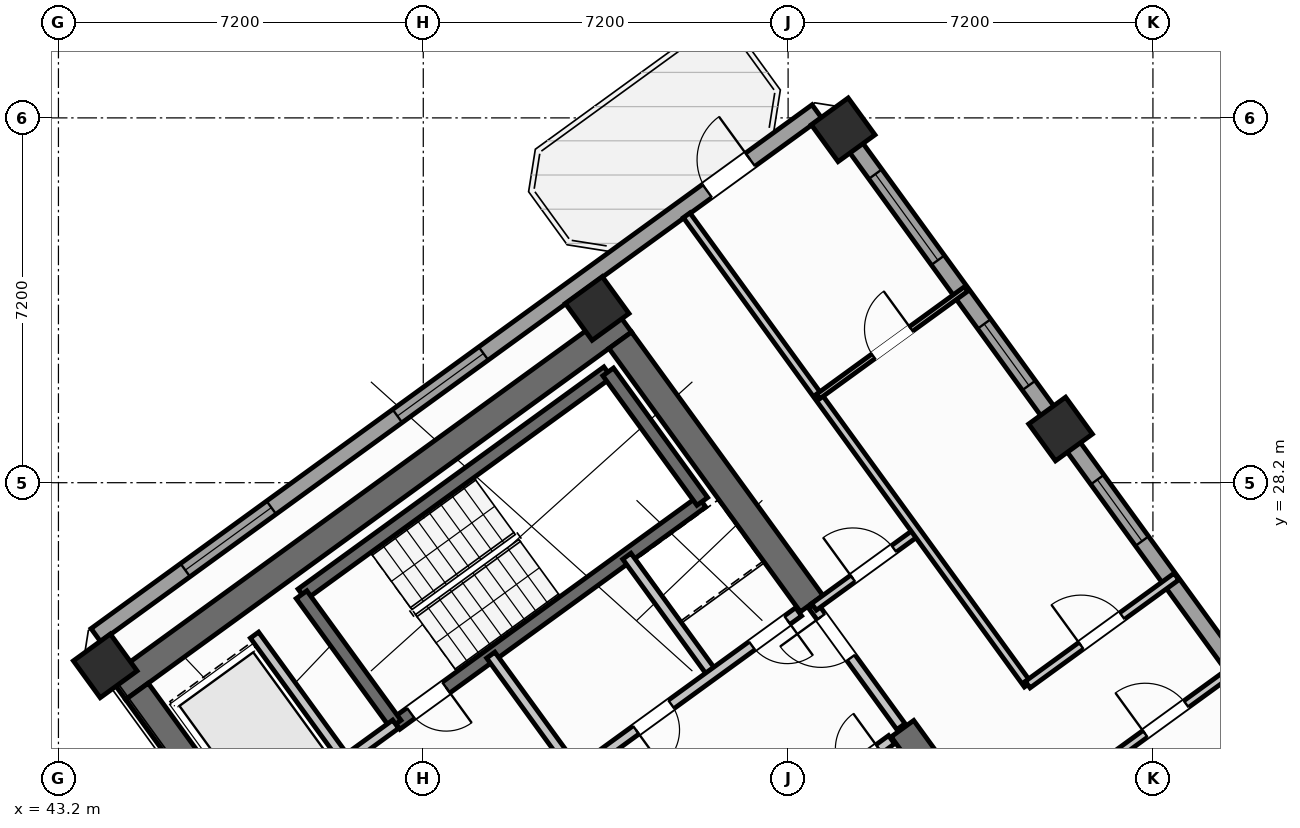
"""IFC4 building model, lengths in metres.
Left out: names, types, materials, properties, quantities, classifications, styles, units other than length and angle.
Written with IfcOpenShell. Run it as: python <this file> out.ifc"""

import sys

from ifc_helpers import new_model, si_unit, direction, frame, frame_2d, origin, origin_2d, place, context, subcontext, project, spatial, rectangle, hollow_rectangle, extrude, source, transform, mapped, element, fill, save


model = new_model("IFC4")
c1 = context("Model", 3, precision=1e-05, world=origin(), true_north=direction((0.0, 1.0)))
c2 = subcontext(c1, "Body", "Model", "MODEL_VIEW")
j1 = project(units=[si_unit("LENGTHUNIT", "METRE"), si_unit("PLANEANGLEUNIT", "RADIAN")], contexts=[c1])
p1 = place(None, origin())
s1 = spatial("IfcSite", under=j1, at=p1, CompositionType="ELEMENT")
p2 = place(p1, origin())
s2 = spatial("IfcBuilding", under=s1, at=p2, CompositionType="ELEMENT")
p3 = place(p2, frame((0.0, 0.0, 132.6)))
s3 = spatial("IfcBuildingStorey", under=s2, at=p3, CompositionType="ELEMENT", Elevation=132.6)
p4 = place(p3, frame((44.365, 24.142, 0.0), z_axis=(0.0, 0.0, 1.0), x_axis=(0.809024304885, 0.587775190107, 0.0)))
e1 = element("IfcWall", 1, at=p4, inside=s3, PredefinedType="SHEAR", context=c2, shape_type="SweptSolid", body=[
    extrude(rectangle(XDim=12.34, YDim=0.55, at=frame_2d((6.17, 0.0))), origin(), (0.0, 0.0, 1.0), 3.32),
])
p5 = place(p3, frame((48.526, 18.884, 0.0), z_axis=(0.0, 0.0, 1.0), x_axis=(-0.587764933797, 0.809031756236, 0.0)))
e2 = element("IfcWall", 2, at=p5, inside=s3, PredefinedType="SHEAR", context=c2, shape_type="SweptSolid", body=[
    extrude(rectangle(XDim=6.425, YDim=0.55, at=frame_2d((3.212, 0.0))), origin(), (0.0, 0.0, 1.0), 3.32),
])
p6 = place(p3, frame((61.958, 20.454, 0.0), z_axis=(0.0, 0.0, 1.0), x_axis=(-0.587802113096, 0.809004744015, 0.0)))
e3 = element("IfcWall", 3, at=p6, inside=s3, PredefinedType="SHEAR", context=c2, shape_type="SweptSolid", body=[
    extrude(rectangle(XDim=3.575, YDim=0.55, at=frame_2d((1.788, 0.0))), origin(), (0.0, 0.0, 1.0), 3.32),
])
p7 = place(p3, frame((58.064, 25.813, 0.0), z_axis=(0.0, 0.0, 1.0), x_axis=(-0.587764933797, 0.809031756236, 0.0)))
e4 = element("IfcWall", 4, at=p7, inside=s3, PredefinedType="SHEAR", context=c2, shape_type="SweptSolid", body=[
    extrude(rectangle(XDim=6.425, YDim=0.55, at=frame_2d((3.212, 0.0))), origin(), (0.0, 0.0, 1.0), 3.32),
])
m1 = source(origin(), c2, "Body", "SweptSolid", [
    extrude(hollow_rectangle(XDim=0.9, YDim=0.9, WallThickness=0.036, at=origin_2d()), origin(), (0.0, 0.0, 1.0), 3.6),
])
for number, where, z_axis, x_axis in (
    (5, (44.124, 24.585, 0.0), (0.0, 0.0, 1.0), (0.809, 0.588, 0.0)),
    (6, (53.832, 31.638, 0.0), (0.0, 0.0, 1.0), (0.809, 0.588, 0.0)),
    (7, (62.977, 29.259, 0.0), (0.0, 0.0, 1.0), (0.809, 0.588, 0.0)),
    (8, (58.686, 35.165, 0.0), (0.0, 0.0, 1.0), (0.809, 0.588, 0.0)),
):
    element("IfcColumn", number, at=place(p3, frame(where, z_axis=z_axis, x_axis=x_axis)), inside=s3, PredefinedType="COLUMN", context=c2, shape_type="MappedRepresentation", body=[
        mapped(m1, transform((0.0, 0.0, 0.0), scale=1.0)),
    ])
p8 = place(p3, frame((43.938, 25.192, 0.0), z_axis=(0.0, 0.0, 1.0), x_axis=(0.809016324578, 0.587786174187, 0.0)))
e9 = element("IfcWall", 9, at=p8, inside=s3, PredefinedType="STANDARD", context=c2, shape_type="SweptSolid", body=[
    extrude(rectangle(XDim=17.587, YDim=0.32, at=frame_2d((8.794, 0.0))), origin(), (0.0, 0.0, 1.0), 3.32),
])
p9 = place(p8, frame((14.914, 0.0, 0.0)))
e10 = element("IfcOpeningElement", 10, at=p9, cuts=e9, PredefinedType="OPENING", context=c2, shape_type="SweptSolid", body=[
    extrude(rectangle(XDim=1.05, YDim=2.15, at=frame_2d((0.525, 1.075))), frame((0.0, 0.17, 0.0), z_axis=(0.0, -1.0, 0.0), x_axis=(1.0, 0.0, 0.0)), (0.0, 0.0, 1.0), 0.34),
])
p10 = place(p8, frame((2.182, 0.0, 0.8)))
e11 = element("IfcOpeningElement", 11, at=p10, cuts=e9, PredefinedType="OPENING", context=c2, shape_type="SweptSolid", body=[
    extrude(rectangle(XDim=2.1, YDim=1.55, at=frame_2d((1.05, 0.775))), frame((0.0, 0.17, 0.0), z_axis=(0.0, -1.0, 0.0), x_axis=(1.0, 0.0, 0.0)), (0.0, 0.0, 1.0), 0.34),
])
p11 = place(p8, frame((7.356, 0.0, 0.8)))
e12 = element("IfcOpeningElement", 12, at=p11, cuts=e9, PredefinedType="OPENING", context=c2, shape_type="SweptSolid", body=[
    extrude(rectangle(XDim=2.1, YDim=1.55, at=frame_2d((1.05, 0.775))), frame((0.0, 0.17, 0.0), z_axis=(0.0, -1.0, 0.0), x_axis=(1.0, 0.0, 0.0)), (0.0, 0.0, 1.0), 0.34),
])
p12 = place(p3, frame((58.455, 35.484, 0.0), z_axis=(0.0, 0.0, 1.0), x_axis=(0.587783625747, -0.809018176127, 0.0)))
e13 = element("IfcWall", 13, at=p12, inside=s3, PredefinedType="STANDARD", context=c2, shape_type="SweptSolid", body=[
    extrude(rectangle(XDim=21.587, YDim=0.32, at=frame_2d((10.794, 0.0))), origin(), (0.0, 0.0, 1.0), 2.745),
])
p13 = place(p12, frame((1.475, 0.0, 0.8)))
e14 = element("IfcOpeningElement", 14, at=p13, cuts=e13, PredefinedType="OPENING", context=c2, shape_type="SweptSolid", body=[
    extrude(rectangle(XDim=2.1, YDim=1.55, at=frame_2d((1.05, 0.775))), frame((0.0, 0.17, 0.0), z_axis=(0.0, -1.0, 0.0), x_axis=(1.0, 0.0, 0.0)), (0.0, 0.0, 1.0), 0.34),
])
p14 = place(p12, frame((5.13, 0.0, 0.85)))
e15 = element("IfcOpeningElement", 15, at=p14, cuts=e13, PredefinedType="OPENING", context=c2, shape_type="SweptSolid", body=[
    extrude(rectangle(XDim=1.5, YDim=1.5, at=frame_2d((0.75, 0.75))), frame((0.0, 0.17, 0.0), z_axis=(0.0, -1.0, 0.0), x_axis=(1.0, 0.0, 0.0)), (0.0, 0.0, 1.0), 0.34),
])
p15 = place(p12, frame((8.929, 0.0, 0.85)))
e16 = element("IfcOpeningElement", 16, at=p15, cuts=e13, PredefinedType="OPENING", context=c2, shape_type="SweptSolid", body=[
    extrude(rectangle(XDim=1.5, YDim=1.5, at=frame_2d((0.75, 0.75))), frame((0.0, 0.17, 0.0), z_axis=(0.0, -1.0, 0.0), x_axis=(1.0, 0.0, 0.0)), (0.0, 0.0, 1.0), 0.34),
])
p16 = place(p12, frame((17.581, 0.0, 0.95)))
e17 = element("IfcOpeningElement", 17, at=p16, cuts=e13, PredefinedType="OPENING", context=c2, shape_type="SweptSolid", body=[
    extrude(rectangle(XDim=1.2, YDim=1.4, at=frame_2d((0.6, 0.7))), frame((0.0, 0.17, 0.0), z_axis=(0.0, -1.0, 0.0), x_axis=(1.0, 0.0, 0.0)), (0.0, 0.0, 1.0), 0.34),
])
p17 = place(p3, frame((48.006, 25.996, 0.0), z_axis=(0.0, 0.0, 1.0), x_axis=(0.80901903764, 0.587782439969, 0.0)))
e18 = element("IfcWall", 18, at=p17, inside=s3, PredefinedType="SHEAR", context=c2, shape_type="SweptSolid", body=[
    extrude(rectangle(XDim=7.46, YDim=0.26, at=frame_2d((3.73, 0.0))), origin(), (0.0, 0.0, 1.0), 3.32),
])
p18 = place(p3, frame((49.863, 23.44, 0.0), z_axis=(0.0, 0.0, 1.0), x_axis=(0.809003474932, 0.587803859759, 0.0)))
e19 = element("IfcWall", 19, at=p18, inside=s3, PredefinedType="SHEAR", context=c2, shape_type="SweptSolid", body=[
    extrude(rectangle(XDim=7.46, YDim=0.26, at=frame_2d((3.73, 0.0))), origin(), (0.0, 0.0, 1.0), 3.32),
])
p19 = place(p18, frame((0.36, 0.0, 0.0)))
e20 = element("IfcOpeningElement", 20, at=p19, cuts=e19, PredefinedType="OPENING", context=c2, shape_type="SweptSolid", body=[
    extrude(rectangle(XDim=0.86, YDim=2.05, at=frame_2d((0.43, 1.025))), frame((0.0, 0.14, 0.0), z_axis=(0.0, -1.0, 0.0), x_axis=(1.0, 0.0, 0.0)), (0.0, 0.0, 1.0), 0.28),
])
p20 = place(p3, frame((49.855, 23.434, 0.0), z_axis=(0.0, 0.0, 1.0), x_axis=(-0.58776738483, 0.809029975545, 0.0)))
e21 = element("IfcWall", 21, at=p20, inside=s3, PredefinedType="SHEAR", context=c2, shape_type="SweptSolid", body=[
    extrude(rectangle(XDim=3.16, YDim=0.26, at=frame_2d((1.58, 0.0))), origin(), (0.0, 0.0, 1.0), 3.32),
])
p21 = place(p3, frame((55.906, 27.831, 0.0), z_axis=(0.0, 0.0, 1.0), x_axis=(-0.587804123638, 0.809003283204, 0.0)))
e22 = element("IfcWall", 22, at=p21, inside=s3, PredefinedType="SHEAR", context=c2, shape_type="SweptSolid", body=[
    extrude(rectangle(XDim=3.16, YDim=0.26, at=frame_2d((1.58, 0.0))), origin(), (0.0, 0.0, 1.0), 3.32),
])
p22 = place(p3, frame((47.065, 21.407, 0.0), z_axis=(0.0, 0.0, 1.0), x_axis=(0.809032984992, 0.587763242466, 0.0)))
e23 = element("IfcWall", 23, at=p22, inside=s3, PredefinedType="STANDARD", context=c2, shape_type="SweptSolid", body=[
    extrude(rectangle(XDim=3.448, YDim=0.2, at=frame_2d((1.724, 0.0))), origin(), (0.0, 0.0, 1.0), 3.31),
])
p23 = place(p22, frame((0.458, 0.0, 0.0)))
e24 = element("IfcOpeningElement", 24, at=p23, cuts=e23, PredefinedType="OPENING", context=c2, shape_type="SweptSolid", body=[
    extrude(rectangle(XDim=1.3, YDim=2.2, at=frame_2d((0.65, 1.1))), frame((0.0, 0.11, 0.0), z_axis=(0.0, -1.0, 0.0), x_axis=(1.0, 0.0, 0.0)), (0.0, 0.0, 1.0), 0.22),
])
p24 = place(p3, frame((56.553, 20.884, 0.0), z_axis=(0.0, 0.0, 1.0), x_axis=(0.809023564264, 0.58777620951, 0.0)))
e25 = element("IfcWall", 25, at=p24, inside=s3, PredefinedType="STANDARD", context=c2, shape_type="SweptSolid", body=[
    extrude(rectangle(XDim=3.818, YDim=0.2, at=frame_2d((1.909, 0.0))), origin(), (0.0, 0.0, 1.0), 3.31),
])
p25 = place(p24, frame((0.57, 0.0, 0.0)))
e26 = element("IfcOpeningElement", 26, at=p25, cuts=e25, PredefinedType="OPENING", context=c2, shape_type="SweptSolid", body=[
    extrude(rectangle(XDim=1.1, YDim=2.15, at=frame_2d((0.55, 1.075))), frame((0.0, 0.11, 0.0), z_axis=(0.0, -1.0, 0.0), x_axis=(1.0, 0.0, 0.0)), (0.0, 0.0, 1.0), 0.22),
])
p26 = place(p24, frame((2.65, 0.0, 0.0)))
e27 = element("IfcOpeningElement", 27, at=p26, cuts=e25, PredefinedType="OPENING", context=c2, shape_type="SweptSolid", body=[
    extrude(rectangle(XDim=0.86, YDim=2.05, at=frame_2d((0.43, 1.025))), frame((0.0, 0.11, 0.0), z_axis=(0.0, -1.0, 0.0), x_axis=(1.0, 0.0, 0.0)), (0.0, 0.0, 1.0), 0.22),
])
p27 = place(p3, frame((48.786, 22.83, 0.0), z_axis=(0.0, 0.0, 1.0), x_axis=(-0.587783856777, 0.809018008275, 0.0)))
e28 = element("IfcWall", 28, at=p27, inside=s3, PredefinedType="STANDARD", context=c2, shape_type="SweptSolid", body=[
    extrude(rectangle(XDim=2.92, YDim=0.2, at=frame_2d((1.46, 0.0))), origin(), (0.0, 0.0, 1.0), 3.31),
])
p28 = place(p3, frame((53.425, 22.468, 0.0), z_axis=(0.0, 0.0, 1.0), x_axis=(-0.5877230039, 0.809062216821, 0.0)))
e29 = element("IfcWall", 29, at=p28, inside=s3, PredefinedType="STANDARD", context=c2, shape_type="SweptSolid", body=[
    extrude(rectangle(XDim=2.88, YDim=0.2, at=frame_2d((1.44, 0.0))), origin(), (0.0, 0.0, 1.0), 3.31),
])
p29 = place(p3, frame((56.111, 24.419, 0.0), z_axis=(0.0, 0.0, 1.0), x_axis=(-0.58777848983, 0.809021907548, 0.0)))
e30 = element("IfcWall", 30, at=p29, inside=s3, PredefinedType="STANDARD", context=c2, shape_type="SweptSolid", body=[
    extrude(rectangle(XDim=2.88, YDim=0.2, at=frame_2d((1.44, 0.0))), origin(), (0.0, 0.0, 1.0), 3.31),
])
p30 = place(p3, frame((53.425, 22.468, 0.0), z_axis=(0.0, 0.0, 1.0), x_axis=(0.809024377198, 0.587775090574, 0.0)))
e31 = element("IfcWall", 31, at=p30, inside=s3, PredefinedType="STANDARD", context=c2, shape_type="SweptSolid", body=[
    extrude(rectangle(XDim=5.418, YDim=0.2, at=frame_2d((2.709, 0.0))), origin(), (0.0, 0.0, 1.0), 3.31),
])
p31 = place(p30, frame((4.28, 0.0, 0.0)))
e32 = element("IfcOpeningElement", 32, at=p31, cuts=e31, PredefinedType="OPENING", context=c2, shape_type="SweptSolid", body=[
    extrude(rectangle(XDim=0.86, YDim=2.05, at=frame_2d((0.43, 1.025))), frame((0.0, 0.11, 0.0), z_axis=(0.0, -1.0, 0.0), x_axis=(1.0, 0.0, 0.0)), (0.0, 0.0, 1.0), 0.22),
])
p32 = place(p30, frame((1.45, 0.0, 0.0)))
e33 = element("IfcOpeningElement", 33, at=p32, cuts=e31, PredefinedType="OPENING", context=c2, shape_type="SweptSolid", body=[
    extrude(rectangle(XDim=0.86, YDim=2.05, at=frame_2d((0.43, 1.025))), frame((0.0, 0.11, 0.0), z_axis=(0.0, -1.0, 0.0), x_axis=(1.0, 0.0, 0.0)), (0.0, 0.0, 1.0), 0.22),
])
p33 = place(p3, frame((59.827, 23.386, 0.0), z_axis=(0.0, 0.0, 1.0), x_axis=(-0.587803840107, 0.809003489211, 0.0)))
e34 = element("IfcWall", 34, at=p33, inside=s3, PredefinedType="STANDARD", context=c2, shape_type="SweptSolid", body=[
    extrude(rectangle(XDim=2.96, YDim=0.2, at=frame_2d((1.48, 0.0))), origin(), (0.0, 0.0, 1.0), 3.31),
])
p34 = place(p33, frame((1.68, 0.0, 0.0)))
e35 = element("IfcOpeningElement", 35, at=p34, cuts=e34, PredefinedType="OPENING", context=c2, shape_type="SweptSolid", body=[
    extrude(rectangle(XDim=1.0, YDim=2.1, at=frame_2d((0.5, 1.05))), frame((0.0, 0.11, 0.0), z_axis=(0.0, -1.0, 0.0), x_axis=(1.0, 0.0, 0.0)), (0.0, 0.0, 1.0), 0.22),
])
p35 = place(p3, frame((58.111, 25.749, 0.0), z_axis=(0.0, 0.0, 1.0), x_axis=(0.809000999347, 0.58780726693, 0.0)))
e36 = element("IfcWall", 36, at=p35, inside=s3, PredefinedType="PARTITIONING", context=c2, shape_type="SweptSolid", body=[
    extrude(rectangle(XDim=2.51, YDim=0.16, at=frame_2d((1.255, 0.0))), origin(), (0.0, 0.0, 1.0), 2.745),
])
p36 = place(p35, frame((0.95, 0.0, 0.0)))
e37 = element("IfcOpeningElement", 37, at=p36, cuts=e36, PredefinedType="OPENING", context=c2, shape_type="SweptSolid", body=[
    extrude(rectangle(XDim=1.0, YDim=2.1, at=frame_2d((0.5, 1.05))), frame((0.0, 0.09, 0.0), z_axis=(0.0, -1.0, 0.0), x_axis=(1.0, 0.0, 0.0)), (0.0, 0.0, 1.0), 0.18),
])
p37 = place(p3, frame((62.328, 24.215, 0.0), z_axis=(0.0, 0.0, 1.0), x_axis=(-0.587778600963, 0.809021826807, 0.0)))
e38 = element("IfcWall", 38, at=p37, inside=s3, PredefinedType="PARTITIONING", context=c2, shape_type="SweptSolid", body=[
    extrude(rectangle(XDim=11.45, YDim=0.16, at=frame_2d((5.725, 0.0))), origin(), (0.0, 0.0, 1.0), 3.31),
])
p38 = place(p3, frame((63.592, 22.475, 0.0), z_axis=(0.0, 0.0, 1.0), x_axis=(0.809035546126, 0.58775971715, 0.0)))
e39 = element("IfcWall", 39, at=p38, inside=s3, PredefinedType="PARTITIONING", context=c2, shape_type="SweptSolid", body=[
    extrude(rectangle(XDim=3.63, YDim=0.16, at=frame_2d((1.815, 0.0))), origin(), (0.0, 0.0, 1.0), 3.31),
])
p39 = place(p38, frame((1.305, 0.0, 0.0)))
e40 = element("IfcOpeningElement", 40, at=p39, cuts=e39, PredefinedType="OPENING", context=c2, shape_type="SweptSolid", body=[
    extrude(rectangle(XDim=1.0, YDim=2.1, at=frame_2d((0.5, 1.05))), frame((0.0, 0.09, 0.0), z_axis=(0.0, -1.0, 0.0), x_axis=(1.0, 0.0, 0.0)), (0.0, 0.0, 1.0), 0.18),
])
p40 = place(p3, frame((62.328, 24.215, 0.0), z_axis=(0.0, 0.0, 1.0), x_axis=(0.809003564202, 0.587803736896, 0.0)))
e41 = element("IfcWall", 41, at=p40, inside=s3, PredefinedType="PARTITIONING", context=c2, shape_type="SweptSolid", body=[
    extrude(rectangle(XDim=3.63, YDim=0.16, at=frame_2d((1.815, 0.0))), origin(), (0.0, 0.0, 1.0), 3.31),
])
p41 = place(p40, frame((1.305, 0.0, 0.0)))
e42 = element("IfcOpeningElement", 42, at=p41, cuts=e41, PredefinedType="OPENING", context=c2, shape_type="SweptSolid", body=[
    extrude(rectangle(XDim=1.0, YDim=2.1, at=frame_2d((0.5, 1.05))), frame((0.0, 0.09, 0.0), z_axis=(0.0, -1.0, 0.0), x_axis=(1.0, 0.0, 0.0)), (0.0, 0.0, 1.0), 0.18),
])
p42 = place(p3, frame((58.195, 29.904, 0.0), z_axis=(0.0, 0.0, 1.0), x_axis=(0.809005039917, 0.58780170584, 0.0)))
e43 = element("IfcWall", 43, at=p42, inside=s3, PredefinedType="PARTITIONING", context=c2, shape_type="SweptSolid", body=[
    extrude(rectangle(XDim=3.61, YDim=0.11, at=frame_2d((1.805, 0.0))), origin(), (0.0, 0.0, 1.0), 3.31),
])
p43 = place(p42, frame((1.345, 0.0, 0.0)))
e44 = element("IfcOpeningElement", 44, at=p43, cuts=e43, PredefinedType="OPENING", context=c2, shape_type="SweptSolid", body=[
    extrude(rectangle(XDim=0.92, YDim=2.08, at=frame_2d((0.46, 1.04))), frame((0.0, 0.065, 0.0), z_axis=(0.0, -1.0, 0.0), x_axis=(1.0, 0.0, 0.0)), (0.0, 0.0, 1.0), 0.13),
])
m2 = source(origin(), c2, "Body", "SweptSolid", [
    extrude(rectangle(XDim=1.05, YDim=2.15, at=frame_2d((0.525, 1.075))), frame((0.0, 0.025, 0.0), z_axis=(0.0, -1.0, 0.0), x_axis=(1.0, 0.0, 0.0)), (0.0, 0.0, 1.0), 0.05),
])
p44 = place(p9, origin())
e45 = element("IfcDoor", 45, at=p44, inside=s3, OperationType="SINGLE_SWING_RIGHT", PredefinedType="DOOR", context=c2, shape_type="MappedRepresentation", body=[
    mapped(m2, transform((0.0, 0.0, 0.0), scale=1.0)),
])
fill(e10, e45)
m3 = source(origin(), c2, "Body", "SweptSolid", [
    extrude(rectangle(XDim=2.1, YDim=1.55, at=frame_2d((1.05, 0.775))), frame((0.0, 0.03, 0.0), z_axis=(0.0, -1.0, 0.0), x_axis=(1.0, 0.0, 0.0)), (0.0, 0.0, 1.0), 0.06),
])
p45 = place(p10, origin())
e46 = element("IfcWindow", 46, at=p45, inside=s3, PartitioningType="SINGLE_PANEL", PredefinedType="WINDOW", context=c2, shape_type="MappedRepresentation", body=[
    mapped(m3, transform((0.0, 0.0, 0.0), scale=1.0)),
])
fill(e11, e46)
p46 = place(p11, origin())
e47 = element("IfcWindow", 47, at=p46, inside=s3, PartitioningType="SINGLE_PANEL", PredefinedType="WINDOW", context=c2, shape_type="MappedRepresentation", body=[
    mapped(m3, transform((0.0, 0.0, 0.0), scale=1.0)),
])
fill(e12, e47)
p47 = place(p13, origin())
e48 = element("IfcWindow", 48, at=p47, inside=s3, PartitioningType="SINGLE_PANEL", PredefinedType="WINDOW", context=c2, shape_type="MappedRepresentation", body=[
    mapped(m3, transform((0.0, 0.0, 0.0), scale=1.0)),
])
fill(e14, e48)
m4 = source(origin(), c2, "Body", "SweptSolid", [
    extrude(rectangle(XDim=1.5, YDim=1.5, at=frame_2d((0.75, 0.75))), frame((0.0, 0.03, 0.0), z_axis=(0.0, -1.0, 0.0), x_axis=(1.0, 0.0, 0.0)), (0.0, 0.0, 1.0), 0.06),
])
p48 = place(p14, origin())
e49 = element("IfcWindow", 49, at=p48, inside=s3, PartitioningType="SINGLE_PANEL", PredefinedType="WINDOW", context=c2, shape_type="MappedRepresentation", body=[
    mapped(m4, transform((0.0, 0.0, 0.0), scale=1.0)),
])
fill(e15, e49)
p49 = place(p15, origin())
e50 = element("IfcWindow", 50, at=p49, inside=s3, PartitioningType="SINGLE_PANEL", PredefinedType="WINDOW", context=c2, shape_type="MappedRepresentation", body=[
    mapped(m4, transform((0.0, 0.0, 0.0), scale=1.0)),
])
fill(e16, e50)
m5 = source(origin(), c2, "Body", "SweptSolid", [
    extrude(rectangle(XDim=0.86, YDim=2.05, at=frame_2d((0.43, 1.025))), frame((0.0, 0.025, 0.0), z_axis=(0.0, -1.0, 0.0), x_axis=(1.0, 0.0, 0.0)), (0.0, 0.0, 1.0), 0.05),
])
p50 = place(p19, frame((0.86, 0.0, 0.0), z_axis=(0.0, 0.0, 1.0), x_axis=(-1.0, 0.0, 0.0)))
e51 = element("IfcDoor", 51, at=p50, inside=s3, OperationType="SINGLE_SWING_LEFT", PredefinedType="DOOR", context=c2, shape_type="MappedRepresentation", body=[
    mapped(m5, transform((0.0, 0.0, 0.0), scale=1.0)),
])
fill(e20, e51)
p51 = place(p31, frame((0.86, 0.0, 0.0), z_axis=(0.0, 0.0, 1.0), x_axis=(-1.0, 0.0, 0.0)))
e52 = element("IfcDoor", 52, at=p51, inside=s3, OperationType="SINGLE_SWING_LEFT", PredefinedType="DOOR", context=c2, shape_type="MappedRepresentation", body=[
    mapped(m5, transform((0.0, 0.0, 0.0), scale=1.0)),
])
fill(e32, e52)
p52 = place(p32, frame((0.86, 0.0, 0.0), z_axis=(0.0, 0.0, 1.0), x_axis=(-1.0, 0.0, 0.0)))
e53 = element("IfcDoor", 53, at=p52, inside=s3, OperationType="SINGLE_SWING_RIGHT", PredefinedType="DOOR", context=c2, shape_type="MappedRepresentation", body=[
    mapped(m5, transform((0.0, 0.0, 0.0), scale=1.0)),
])
fill(e33, e53)
m6 = source(origin(), c2, "Body", "SweptSolid", [
    extrude(rectangle(XDim=1.0, YDim=2.1, at=frame_2d((0.5, 1.05))), frame((0.0, 0.025, 0.0), z_axis=(0.0, -1.0, 0.0), x_axis=(1.0, 0.0, 0.0)), (0.0, 0.0, 1.0), 0.05),
])
p53 = place(p36, origin())
e54 = element("IfcDoor", 54, at=p53, inside=s3, OperationType="SINGLE_SWING_LEFT", PredefinedType="DOOR", context=c2, shape_type="MappedRepresentation", body=[
    mapped(m6, transform((0.0, 0.0, 0.0), scale=1.0)),
])
fill(e37, e54)
p54 = place(p34, origin())
e55 = element("IfcDoor", 55, at=p54, inside=s3, OperationType="SINGLE_SWING_RIGHT", PredefinedType="DOOR", context=c2, shape_type="MappedRepresentation", body=[
    mapped(m6, transform((0.0, 0.0, 0.0), scale=1.0)),
])
fill(e35, e55)
p55 = place(p41, origin())
e56 = element("IfcDoor", 56, at=p55, inside=s3, OperationType="SINGLE_SWING_LEFT", PredefinedType="DOOR", context=c2, shape_type="MappedRepresentation", body=[
    mapped(m6, transform((0.0, 0.0, 0.0), scale=1.0)),
])
fill(e42, e56)
m7 = source(origin(), c2, "Body", "SweptSolid", [
    extrude(rectangle(XDim=0.92, YDim=2.08, at=frame_2d((0.46, 1.04))), frame((0.0, 0.025, 0.0), z_axis=(0.0, -1.0, 0.0), x_axis=(1.0, 0.0, 0.0)), (0.0, 0.0, 1.0), 0.05),
])
p56 = place(p43, origin())
e57 = element("IfcDoor", 57, at=p56, inside=s3, OperationType="SINGLE_SWING_RIGHT", PredefinedType="DOOR", context=c2, shape_type="MappedRepresentation", body=[
    mapped(m7, transform((0.0, 0.0, 0.0), scale=1.0)),
])
fill(e44, e57)
p57 = place(p39, origin())
e58 = element("IfcDoor", 58, at=p57, inside=s3, OperationType="SINGLE_SWING_LEFT", PredefinedType="DOOR", context=c2, shape_type="MappedRepresentation", body=[
    mapped(m6, transform((0.0, 0.0, 0.0), scale=1.0)),
])
fill(e40, e58)
save(model, sys.argv[1])
